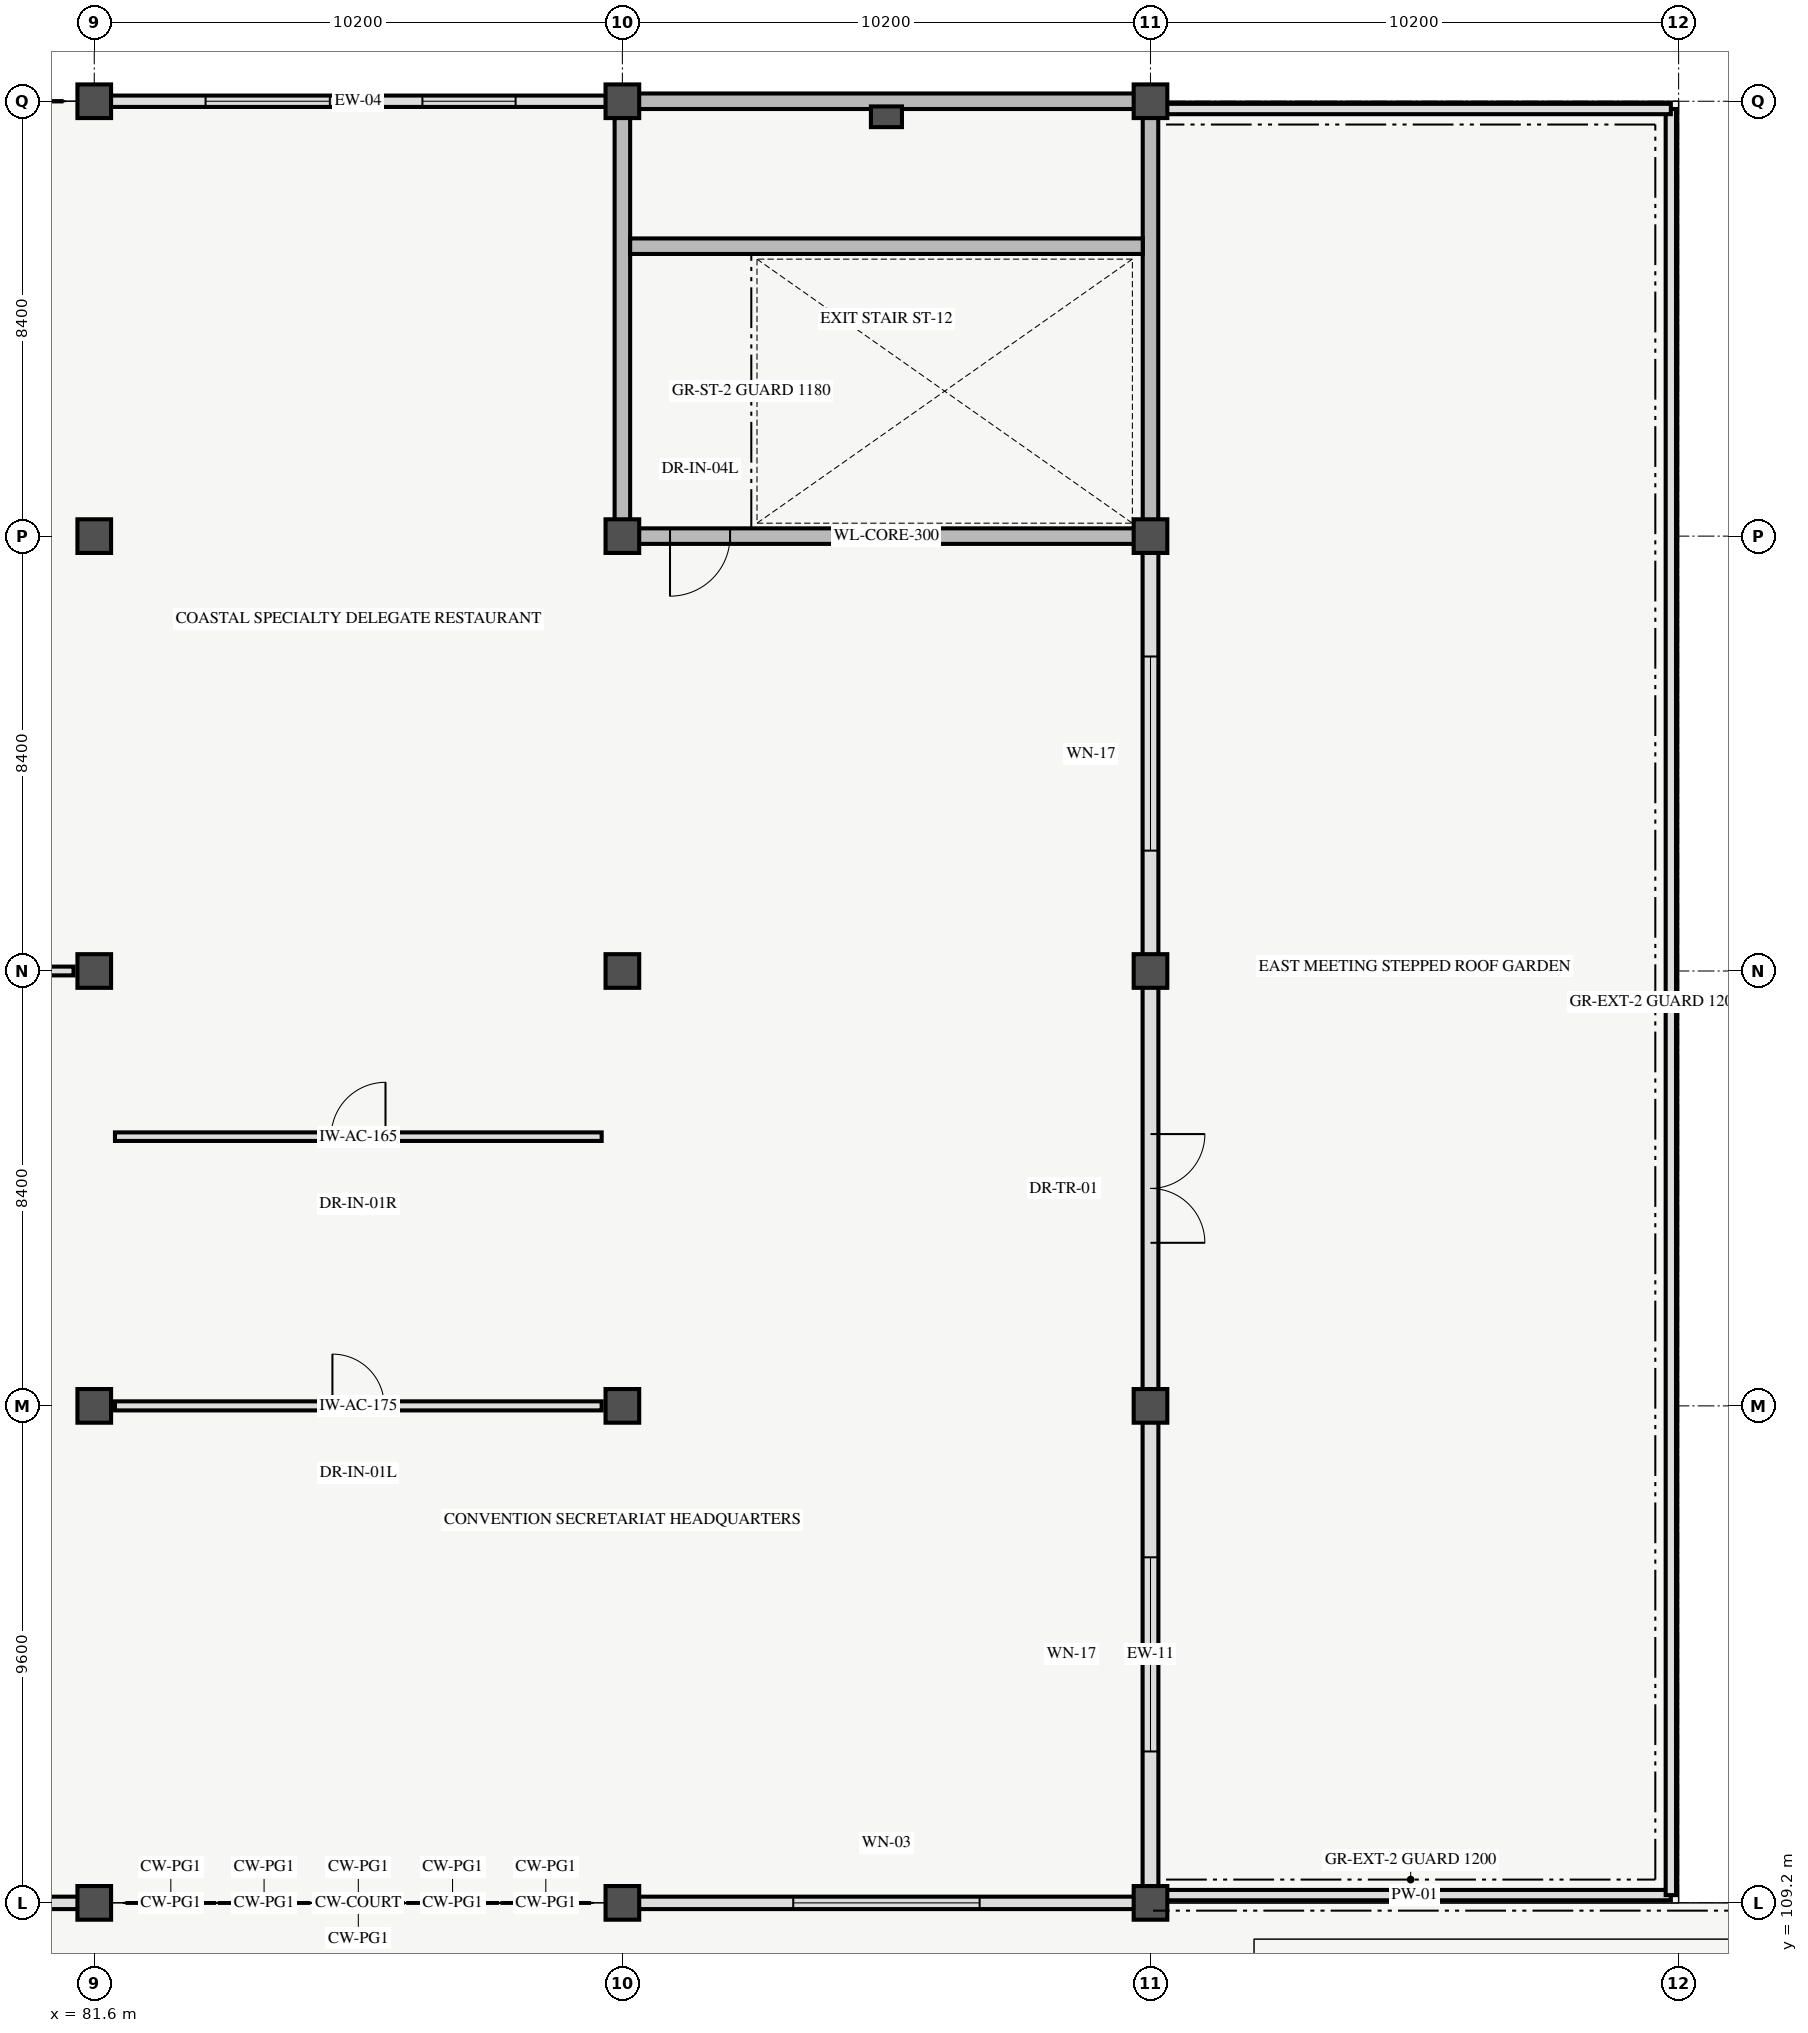
"""IFC4 building model, lengths in metres.
Left out: names, types, materials, properties, quantities, classifications, styles, units other than length and angle.
Written with IfcOpenShell. Run it as: python <this file> out.ifc"""

import sys

from ifc_helpers import new_model, si_unit, direction, frame, frame_2d, origin, origin_2d, place, context, subcontext, project, spatial, rectangle, extrude, element, fill, save


model = new_model("IFC4")
c1 = context("Model", 3, precision=1e-05, world=origin(), true_north=direction((0.0, 1.0)))
c2 = subcontext(c1, "Body", "Model", "MODEL_VIEW")
j1 = project(units=[si_unit("LENGTHUNIT", "METRE"), si_unit("PLANEANGLEUNIT", "RADIAN")], contexts=[c1])
p1 = place(None, origin())
s1 = spatial("IfcSite", under=j1, at=p1, CompositionType="ELEMENT")
p2 = place(p1, origin())
s2 = spatial("IfcBuilding", under=s1, at=p2, CompositionType="ELEMENT")
p3 = place(p2, frame((0.0, 0.0, 15.0)))
s3 = spatial("IfcBuildingStorey", under=s2, at=p3, CompositionType="ELEMENT", Elevation=15.0)
for number, where, z_axis, x_axis in (
    (1, (81.6, 109.2, 0.0), (0.0, 0.0, 1.0), (1.0, 0.0, 0.0)),
    (2, (81.6, 118.8, 0.0), (0.0, 0.0, 1.0), (1.0, 0.0, 0.0)),
    (3, (81.6, 127.2, 0.0), (0.0, 0.0, 1.0), (1.0, 0.0, 0.0)),
    (4, (81.6, 135.6, 0.0), (0.0, 0.0, 1.0), (1.0, 0.0, 0.0)),
    (5, (81.6, 144.0, 0.0), (0.0, 0.0, 1.0), (1.0, 0.0, 0.0)),
    (6, (91.8, 109.2, 0.0), (0.0, 0.0, 1.0), (1.0, 0.0, 0.0)),
    (7, (91.8, 118.8, 0.0), (0.0, 0.0, 1.0), (1.0, 0.0, 0.0)),
    (8, (91.8, 127.2, 0.0), (0.0, 0.0, 1.0), (1.0, 0.0, 0.0)),
    (9, (91.8, 135.6, 0.0), (0.0, 0.0, 1.0), (1.0, 0.0, 0.0)),
    (10, (91.8, 144.0, 0.0), (0.0, 0.0, 1.0), (1.0, 0.0, 0.0)),
    (11, (102.0, 109.2, 0.0), (0.0, 0.0, 1.0), (1.0, 0.0, 0.0)),
    (12, (102.0, 118.8, 0.0), (0.0, 0.0, 1.0), (1.0, 0.0, 0.0)),
    (13, (102.0, 127.2, 0.0), (0.0, 0.0, 1.0), (1.0, 0.0, 0.0)),
    (14, (102.0, 135.6, 0.0), (0.0, 0.0, 1.0), (1.0, 0.0, 0.0)),
    (15, (102.0, 144.0, 0.0), (0.0, 0.0, 1.0), (1.0, 0.0, 0.0)),
):
    element("IfcColumn", number, at=place(p3, frame(where, z_axis=z_axis, x_axis=x_axis)), inside=s3, PredefinedType="COLUMN", context=c2, shape_type="SweptSolid", body=[
        extrude(rectangle(XDim=0.65, YDim=0.65, at=origin_2d()), origin(), (0.0, 0.0, 1.0), 4.2),
    ])
p4 = place(p3, frame((96.9, 143.7, 0.0), z_axis=(0.0, 0.0, 1.0), x_axis=(1.0, 0.0, 0.0)))
e16 = element("IfcColumn", 16, at=p4, inside=s3, PredefinedType="PILASTER", context=c2, shape_type="SweptSolid", body=[
    extrude(rectangle(XDim=0.6, YDim=0.4, at=origin_2d()), origin(), (0.0, 0.0, 1.0), 4.2),
])
p5 = place(p3, frame((71.64, 109.2, 0.0), z_axis=(0.0, 0.0, 1.0), x_axis=(1.0, 0.0, 0.0)))
e17 = element("IfcWall", 17, at=p5, inside=s3, PredefinedType="STANDARD", context=c2, shape_type="SweptSolid", body=[
    extrude(rectangle(XDim=9.72, YDim=0.24, at=frame_2d((4.86, 0.0))), origin(), (0.0, 0.0, 1.0), 3.06),
])
p6 = place(p5, frame((3.06, 0.0, 0.9)))
e18 = element("IfcOpeningElement", 18, at=p6, cuts=e17, PredefinedType="OPENING", context=c2, shape_type="SweptSolid", body=[
    extrude(rectangle(XDim=3.6, YDim=2.1, at=frame_2d((1.8, 1.05))), frame((0.0, 0.13, 0.0), z_axis=(0.0, -1.0, 0.0), x_axis=(1.0, 0.0, 0.0)), (0.0, 0.0, 1.0), 0.26),
])
p7 = place(p3, frame((81.84, 144.0, 0.0), z_axis=(0.0, 0.0, 1.0), x_axis=(1.0, 0.0, 0.0)))
e19 = element("IfcWall", 19, at=p7, inside=s3, PredefinedType="STANDARD", context=c2, shape_type="SweptSolid", body=[
    extrude(rectangle(XDim=9.72, YDim=0.22, at=frame_2d((4.86, 0.0))), origin(), (0.0, 0.0, 1.0), 3.06),
])
p8 = place(p7, frame((1.91, 0.0, 0.7)))
e20 = element("IfcOpeningElement", 20, at=p8, cuts=e19, PredefinedType="OPENING", context=c2, shape_type="SweptSolid", body=[
    extrude(rectangle(XDim=2.4, YDim=2.1, at=frame_2d((1.2, 1.05))), frame((0.0, 0.12, 0.0), z_axis=(0.0, -1.0, 0.0), x_axis=(1.0, 0.0, 0.0)), (0.0, 0.0, 1.0), 0.24),
])
p9 = place(p7, frame((6.098, 0.0, 0.85)))
e21 = element("IfcOpeningElement", 21, at=p9, cuts=e19, PredefinedType="OPENING", context=c2, shape_type="SweptSolid", body=[
    extrude(rectangle(XDim=1.8, YDim=1.8, at=frame_2d((0.9, 0.9))), frame((0.0, 0.12, 0.0), z_axis=(0.0, -1.0, 0.0), x_axis=(1.0, 0.0, 0.0)), (0.0, 0.0, 1.0), 0.24),
])
p10 = place(p3, frame((92.04, 109.2, 0.0), z_axis=(0.0, 0.0, 1.0), x_axis=(1.0, 0.0, 0.0)))
e22 = element("IfcWall", 22, at=p10, inside=s3, PredefinedType="STANDARD", context=c2, shape_type="SweptSolid", body=[
    extrude(rectangle(XDim=9.72, YDim=0.24, at=frame_2d((4.86, 0.0))), origin(), (0.0, 0.0, 1.0), 3.06),
])
p11 = place(p10, frame((3.06, 0.0, 0.9)))
e23 = element("IfcOpeningElement", 23, at=p11, cuts=e22, PredefinedType="OPENING", context=c2, shape_type="SweptSolid", body=[
    extrude(rectangle(XDim=3.6, YDim=2.1, at=frame_2d((1.8, 1.05))), frame((0.0, 0.13, 0.0), z_axis=(0.0, -1.0, 0.0), x_axis=(1.0, 0.0, 0.0)), (0.0, 0.0, 1.0), 0.26),
])
p12 = place(p3, frame((102.0, 109.44, 0.0), z_axis=(0.0, 0.0, 1.0), x_axis=(0.0, 1.0, 0.0)))
e24 = element("IfcWall", 24, at=p12, inside=s3, PredefinedType="STANDARD", context=c2, shape_type="SweptSolid", body=[
    extrude(rectangle(XDim=9.12, YDim=0.305, at=frame_2d((4.56, 0.0))), origin(), (0.0, 0.0, 1.0), 3.06),
])
p13 = place(p12, frame((2.685, 0.0, 0.9)))
e25 = element("IfcOpeningElement", 25, at=p13, cuts=e24, PredefinedType="OPENING", context=c2, shape_type="SweptSolid", body=[
    extrude(rectangle(XDim=3.75, YDim=1.72, at=frame_2d((1.875, 0.86))), frame((0.0, 0.162, 0.0), z_axis=(0.0, -1.0, 0.0), x_axis=(1.0, 0.0, 0.0)), (0.0, 0.0, 1.0), 0.325),
])
p14 = place(p3, frame((102.0, 119.04, 0.0), z_axis=(0.0, 0.0, 1.0), x_axis=(0.0, 1.0, 0.0)))
e26 = element("IfcWall", 26, at=p14, inside=s3, PredefinedType="STANDARD", context=c2, shape_type="SweptSolid", body=[
    extrude(rectangle(XDim=7.92, YDim=0.305, at=frame_2d((3.96, 0.0))), origin(), (0.0, 0.0, 1.0), 3.06),
])
p15 = place(p14, frame((2.91, 0.0, 0.0)))
e27 = element("IfcOpeningElement", 27, at=p15, cuts=e26, PredefinedType="OPENING", context=c2, shape_type="SweptSolid", body=[
    extrude(rectangle(XDim=2.1, YDim=2.3, at=frame_2d((1.05, 1.15))), frame((0.0, 0.162, 0.0), z_axis=(0.0, -1.0, 0.0), x_axis=(1.0, 0.0, 0.0)), (0.0, 0.0, 1.0), 0.325),
])
p16 = place(p3, frame((102.0, 127.44, 0.0), z_axis=(0.0, 0.0, 1.0), x_axis=(0.0, 1.0, 0.0)))
e28 = element("IfcWall", 28, at=p16, inside=s3, PredefinedType="STANDARD", context=c2, shape_type="SweptSolid", body=[
    extrude(rectangle(XDim=7.92, YDim=0.305, at=frame_2d((3.96, 0.0))), origin(), (0.0, 0.0, 1.0), 3.06),
])
p17 = place(p16, frame((2.085, 0.0, 0.9)))
e29 = element("IfcOpeningElement", 29, at=p17, cuts=e28, PredefinedType="OPENING", context=c2, shape_type="SweptSolid", body=[
    extrude(rectangle(XDim=3.75, YDim=1.72, at=frame_2d((1.875, 0.86))), frame((0.0, 0.162, 0.0), z_axis=(0.0, -1.0, 0.0), x_axis=(1.0, 0.0, 0.0)), (0.0, 0.0, 1.0), 0.325),
])
p18 = place(p3, frame((102.15, 109.35, 0.0), z_axis=(0.0, 0.0, 1.0), x_axis=(1.0, 0.0, 0.0)))
e30 = element("IfcWall", 30, at=p18, inside=s3, PredefinedType="PARAPET", context=c2, shape_type="SweptSolid", body=[
    extrude(rectangle(XDim=9.9, YDim=0.2, at=frame_2d((4.95, 0.0))), origin(), (0.0, 0.0, 1.0), 1.1),
])
p19 = place(p3, frame((112.05, 109.35, 0.0), z_axis=(0.0, 0.0, 1.0), x_axis=(0.0, 1.0, 0.0)))
e31 = element("IfcWall", 31, at=p19, inside=s3, PredefinedType="PARAPET", context=c2, shape_type="SweptSolid", body=[
    extrude(rectangle(XDim=34.5, YDim=0.2, at=frame_2d((17.25, 0.0))), origin(), (0.0, 0.0, 1.0), 1.1),
])
p20 = place(p3, frame((112.05, 143.85, 0.0), z_axis=(0.0, 0.0, 1.0), x_axis=(-1.0, 0.0, 0.0)))
e32 = element("IfcWall", 32, at=p20, inside=s3, PredefinedType="PARAPET", context=c2, shape_type="SweptSolid", body=[
    extrude(rectangle(XDim=9.9, YDim=0.2, at=frame_2d((4.95, 0.0))), origin(), (0.0, 0.0, 1.0), 1.1),
])
p21 = place(p3, frame((91.8, 135.6, 0.0), z_axis=(0.0, 0.0, 1.0), x_axis=(1.0, 0.0, 0.0)))
e33 = element("IfcWall", 33, at=p21, inside=s3, PredefinedType="SHEAR", context=c2, shape_type="SweptSolid", body=[
    extrude(rectangle(XDim=10.2, YDim=0.3, at=frame_2d((5.1, 0.0))), origin(), (0.0, 0.0, 1.0), 4.2),
])
p22 = place(p21, frame((0.92, 0.0, 0.0)))
e34 = element("IfcOpeningElement", 34, at=p22, cuts=e33, PredefinedType="OPENING", context=c2, shape_type="SweptSolid", body=[
    extrude(rectangle(XDim=1.16, YDim=2.2, at=frame_2d((0.58, 1.1))), frame((0.0, 0.16, 0.0), z_axis=(0.0, -1.0, 0.0), x_axis=(1.0, 0.0, 0.0)), (0.0, 0.0, 1.0), 0.32),
])
p23 = place(p3, frame((91.8, 144.0, 0.0), z_axis=(0.0, 0.0, 1.0), x_axis=(1.0, 0.0, 0.0)))
e35 = element("IfcWall", 35, at=p23, inside=s3, PredefinedType="SHEAR", context=c2, shape_type="SweptSolid", body=[
    extrude(rectangle(XDim=10.2, YDim=0.3, at=frame_2d((5.1, 0.0))), origin(), (0.0, 0.0, 1.0), 4.2),
])
for number, where, z_axis, x_axis in (
    (36, (91.8, 135.6, 0.0), (0.0, 0.0, 1.0), (0.0, 1.0, 0.0)),
    (37, (102.0, 135.6, 0.0), (0.0, 0.0, 1.0), (0.0, 1.0, 0.0)),
):
    element("IfcWall", number, at=place(p3, frame(where, z_axis=z_axis, x_axis=x_axis)), inside=s3, PredefinedType="SHEAR", context=c2, shape_type="SweptSolid", body=[
        extrude(rectangle(XDim=8.4, YDim=0.3, at=frame_2d((4.2, 0.0))), origin(), (0.0, 0.0, 1.0), 4.2),
    ])
p24 = place(p3, frame((91.95, 141.2, 0.0), z_axis=(0.0, 0.0, 1.0), x_axis=(1.0, 0.0, 0.0)))
e38 = element("IfcWall", 38, at=p24, inside=s3, PredefinedType="SHEAR", context=c2, shape_type="SweptSolid", body=[
    extrude(rectangle(XDim=9.9, YDim=0.3, at=frame_2d((4.95, 0.0))), origin(), (0.0, 0.0, 1.0), 4.2),
])
p25 = place(p3, frame((71.8, 127.2, 0.0), z_axis=(0.0, 0.0, 1.0), x_axis=(1.0, 0.0, 0.0)))
e39 = element("IfcWall", 39, at=p25, inside=s3, PredefinedType="MOVABLE", context=c2, shape_type="SweptSolid", body=[
    extrude(rectangle(XDim=9.4, YDim=0.17, at=frame_2d((4.7, 0.0))), origin(), (0.0, 0.0, 1.0), 3.06),
])
p26 = place(p25, frame((3.9, 0.0, 0.0)))
e40 = element("IfcOpeningElement", 40, at=p26, cuts=e39, PredefinedType="OPENING", context=c2, shape_type="SweptSolid", body=[
    extrude(rectangle(XDim=1.6, YDim=2.2, at=frame_2d((0.8, 1.1))), frame((0.0, 0.095, 0.0), z_axis=(0.0, -1.0, 0.0), x_axis=(1.0, 0.0, 0.0)), (0.0, 0.0, 1.0), 0.19),
])
p27 = place(p3, frame((82.0, 118.8, 0.0), z_axis=(0.0, 0.0, 1.0), x_axis=(1.0, 0.0, 0.0)))
e41 = element("IfcWall", 41, at=p27, inside=s3, PredefinedType="PARTITIONING", context=c2, shape_type="SweptSolid", body=[
    extrude(rectangle(XDim=9.4, YDim=0.175, at=frame_2d((4.7, 0.0))), origin(), (0.0, 0.0, 1.0), 3.06),
])
p28 = place(p27, frame((4.2, 0.0, 0.0)))
e42 = element("IfcOpeningElement", 42, at=p28, cuts=e41, PredefinedType="OPENING", context=c2, shape_type="SweptSolid", body=[
    extrude(rectangle(XDim=1.0, YDim=2.15, at=frame_2d((0.5, 1.075))), frame((0.0, 0.097, 0.0), z_axis=(0.0, -1.0, 0.0), x_axis=(1.0, 0.0, 0.0)), (0.0, 0.0, 1.0), 0.195),
])
p29 = place(p3, frame((82.0, 124.0, 0.0), z_axis=(0.0, 0.0, 1.0), x_axis=(1.0, 0.0, 0.0)))
e43 = element("IfcWall", 43, at=p29, inside=s3, PredefinedType="PARTITIONING", context=c2, shape_type="SweptSolid", body=[
    extrude(rectangle(XDim=9.4, YDim=0.165, at=frame_2d((4.7, 0.0))), origin(), (0.0, 0.0, 1.0), 3.06),
])
p30 = place(p29, frame((4.175, 0.0, 0.0)))
e44 = element("IfcOpeningElement", 44, at=p30, cuts=e43, PredefinedType="OPENING", context=c2, shape_type="SweptSolid", body=[
    extrude(rectangle(XDim=1.05, YDim=2.15, at=frame_2d((0.525, 1.075))), frame((0.0, 0.093, 0.0), z_axis=(0.0, -1.0, 0.0), x_axis=(1.0, 0.0, 0.0)), (0.0, 0.0, 1.0), 0.185),
])
p31 = place(p8, origin())
e45 = element("IfcWindow", 45, at=p31, inside=s3, PartitioningType="DOUBLE_PANEL_VERTICAL", PredefinedType="WINDOW", context=c2, shape_type="SweptSolid", body=[
    extrude(rectangle(XDim=2.4, YDim=2.1, at=frame_2d((1.2, 1.05))), frame((0.0, 0.03, 0.0), z_axis=(0.0, -1.0, 0.0), x_axis=(1.0, 0.0, 0.0)), (0.0, 0.0, 1.0), 0.06),
])
fill(e20, e45)
p32 = place(p9, origin())
e46 = element("IfcWindow", 46, at=p32, inside=s3, PartitioningType="DOUBLE_PANEL_VERTICAL", PredefinedType="WINDOW", context=c2, shape_type="SweptSolid", body=[
    extrude(rectangle(XDim=1.8, YDim=1.8, at=frame_2d((0.9, 0.9))), frame((0.0, 0.03, 0.0), z_axis=(0.0, -1.0, 0.0), x_axis=(1.0, 0.0, 0.0)), (0.0, 0.0, 1.0), 0.06),
])
fill(e21, e46)
p33 = place(p11, origin())
e47 = element("IfcWindow", 47, at=p33, inside=s3, PartitioningType="TRIPLE_PANEL_VERTICAL", PredefinedType="WINDOW", context=c2, shape_type="SweptSolid", body=[
    extrude(rectangle(XDim=3.6, YDim=2.1, at=frame_2d((1.8, 1.05))), frame((0.0, 0.03, 0.0), z_axis=(0.0, -1.0, 0.0), x_axis=(1.0, 0.0, 0.0)), (0.0, 0.0, 1.0), 0.06),
])
fill(e23, e47)
p34 = place(p13, origin())
e48 = element("IfcWindow", 48, at=p34, inside=s3, PartitioningType="TRIPLE_PANEL_VERTICAL", PredefinedType="WINDOW", context=c2, shape_type="SweptSolid", body=[
    extrude(rectangle(XDim=3.75, YDim=1.72, at=frame_2d((1.875, 0.86))), frame((0.0, 0.03, 0.0), z_axis=(0.0, -1.0, 0.0), x_axis=(1.0, 0.0, 0.0)), (0.0, 0.0, 1.0), 0.06),
])
fill(e25, e48)
p35 = place(p15, frame((2.1, 0.0, 0.0), z_axis=(0.0, 0.0, 1.0), x_axis=(-1.0, 0.0, 0.0)))
e49 = element("IfcDoor", 49, at=p35, inside=s3, OperationType="DOUBLE_DOOR_SINGLE_SWING", PredefinedType="DOOR", context=c2, shape_type="SweptSolid", body=[
    extrude(rectangle(XDim=2.1, YDim=2.3, at=frame_2d((1.05, 1.15))), frame((0.0, 0.025, 0.0), z_axis=(0.0, -1.0, 0.0), x_axis=(1.0, 0.0, 0.0)), (0.0, 0.0, 1.0), 0.05),
])
fill(e27, e49)
p36 = place(p17, origin())
e50 = element("IfcWindow", 50, at=p36, inside=s3, PartitioningType="TRIPLE_PANEL_VERTICAL", PredefinedType="WINDOW", context=c2, shape_type="SweptSolid", body=[
    extrude(rectangle(XDim=3.75, YDim=1.72, at=frame_2d((1.875, 0.86))), frame((0.0, 0.03, 0.0), z_axis=(0.0, -1.0, 0.0), x_axis=(1.0, 0.0, 0.0)), (0.0, 0.0, 1.0), 0.06),
])
fill(e29, e50)
p37 = place(p22, origin())
e51 = element("IfcDoor", 51, at=p37, inside=s3, OperationType="SINGLE_SWING_LEFT", PredefinedType="DOOR", context=c2, shape_type="SweptSolid", body=[
    extrude(rectangle(XDim=1.16, YDim=2.2, at=frame_2d((0.58, 1.1))), frame((0.0, 0.025, 0.0), z_axis=(0.0, -1.0, 0.0), x_axis=(1.0, 0.0, 0.0)), (0.0, 0.0, 1.0), 0.05),
])
fill(e34, e51)
p38 = place(p28, origin())
e52 = element("IfcDoor", 52, at=p38, inside=s3, OperationType="SINGLE_SWING_LEFT", PredefinedType="DOOR", context=c2, shape_type="SweptSolid", body=[
    extrude(rectangle(XDim=1.0, YDim=2.15, at=frame_2d((0.5, 1.075))), frame((0.0, 0.025, 0.0), z_axis=(0.0, -1.0, 0.0), x_axis=(1.0, 0.0, 0.0)), (0.0, 0.0, 1.0), 0.05),
])
fill(e42, e52)
p39 = place(p30, origin())
e53 = element("IfcDoor", 53, at=p39, inside=s3, OperationType="SINGLE_SWING_RIGHT", PredefinedType="DOOR", context=c2, shape_type="SweptSolid", body=[
    extrude(rectangle(XDim=1.05, YDim=2.15, at=frame_2d((0.525, 1.075))), frame((0.0, 0.025, 0.0), z_axis=(0.0, -1.0, 0.0), x_axis=(1.0, 0.0, 0.0)), (0.0, 0.0, 1.0), 0.05),
])
fill(e44, e53)
save(model, sys.argv[1])
